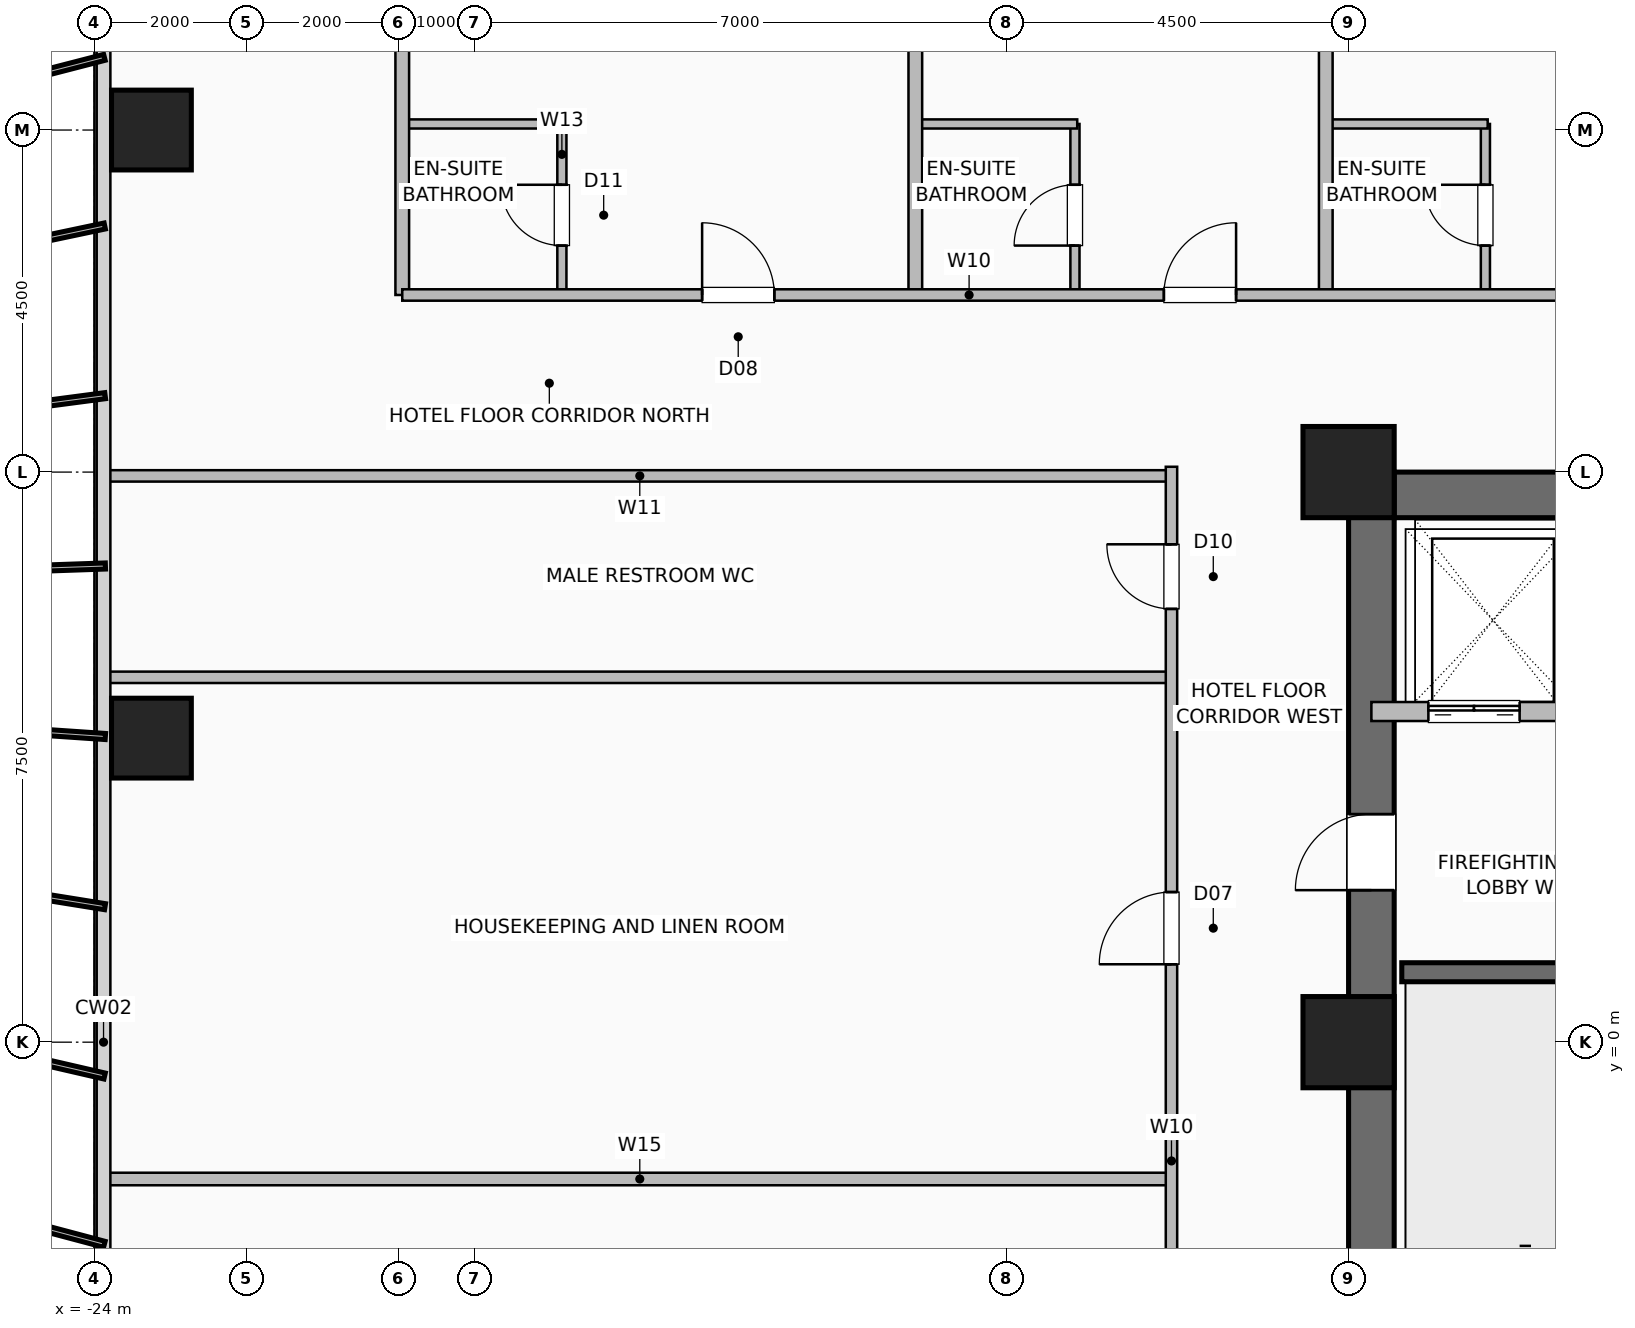
"""IFC4 building model, lengths in metres.
Left out: names, types, materials, properties, quantities, classifications, styles, units other than length and angle.
Written with IfcOpenShell. Run it as: python <this file> out.ifc"""

import sys

from ifc_helpers import new_model, si_unit, direction, frame, frame_2d, origin, origin_2d, place, context, subcontext, project, spatial, rectangle, hollow_rectangle, extrude, element, fill, save


model = new_model("IFC4")
c1 = context("Model", 3, precision=1e-05, world=origin(), true_north=direction((0.0, 1.0)))
c2 = subcontext(c1, "Body", "Model", "MODEL_VIEW")
j1 = project(units=[si_unit("LENGTHUNIT", "METRE"), si_unit("PLANEANGLEUNIT", "RADIAN")], contexts=[c1])
p1 = place(None, origin())
s1 = spatial("IfcSite", under=j1, at=p1, CompositionType="ELEMENT")
p2 = place(p1, origin())
s2 = spatial("IfcBuilding", under=s1, at=p2, CompositionType="ELEMENT")
p3 = place(p2, frame((0.0, 0.0, 69.0)))
s3 = spatial("IfcBuildingStorey", under=s2, at=p3, CompositionType="ELEMENT", Elevation=69.0)
for number, where, z_axis, x_axis in (
    (1, (-7.5, 7.5, 0.0), (0.0, 0.0, 1.0), (1.0, 0.0, 0.0)),
    (2, (-7.5, 0.0, 0.0), (0.0, 0.0, 1.0), (1.0, 0.0, 0.0)),
):
    element("IfcColumn", number, at=place(p3, frame(where, z_axis=z_axis, x_axis=x_axis)), inside=s3, PredefinedType="COLUMN", context=c2, shape_type="SweptSolid", body=[
        extrude(hollow_rectangle(XDim=1.2, YDim=1.2, WallThickness=0.055, at=origin_2d()), origin(), (0.0, 0.0, 1.0), 3.5),
    ])
for number, where, z_axis, x_axis in (
    (3, (-23.25, 4.0, 0.0), (0.0, 0.0, 1.0), (1.0, 0.0, 0.0)),
    (4, (-23.25, 12.0, 0.0), (0.0, 0.0, 1.0), (1.0, 0.0, 0.0)),
):
    element("IfcColumn", number, at=place(p3, frame(where, z_axis=z_axis, x_axis=x_axis)), inside=s3, PredefinedType="COLUMN", context=c2, shape_type="SweptSolid", body=[
        extrude(hollow_rectangle(XDim=1.05, YDim=1.05, WallThickness=0.05, at=origin_2d()), origin(), (0.0, 0.0, 1.0), 3.5),
    ])
p4 = place(p3, frame((-7.5, 7.2, 0.0), z_axis=(0.0, 0.0, 1.0), x_axis=(1.0, 0.0, 0.0)))
e5 = element("IfcWall", 5, at=p4, inside=s3, PredefinedType="SHEAR", context=c2, shape_type="SweptSolid", body=[
    extrude(rectangle(XDim=15.0, YDim=0.6, at=frame_2d((7.5, 0.0))), origin(), (0.0, 0.0, 1.0), 3.25),
])
p5 = place(p3, frame((-7.2, -7.5, 0.0), z_axis=(0.0, 0.0, 1.0), x_axis=(0.0, 1.0, 0.0)))
e6 = element("IfcWall", 6, at=p5, inside=s3, PredefinedType="SHEAR", context=c2, shape_type="SweptSolid", body=[
    extrude(rectangle(XDim=15.0, YDim=0.6, at=frame_2d((7.5, 0.0))), origin(), (0.0, 0.0, 1.0), 3.25),
])
p6 = place(p5, frame((9.5, 0.0, 0.0)))
e7 = element("IfcOpeningElement", 7, at=p6, cuts=e6, PredefinedType="OPENING", context=c2, shape_type="SweptSolid", body=[
    extrude(rectangle(XDim=1.0, YDim=2.08, at=frame_2d((0.5, 1.04))), frame((0.0, 0.31, 0.0), z_axis=(0.0, -1.0, 0.0), x_axis=(1.0, 0.0, 0.0)), (0.0, 0.0, 1.0), 0.62),
])
p7 = place(p3, frame((-6.8, 0.92, 0.0), z_axis=(0.0, 0.0, 1.0), x_axis=(1.0, 0.0, 0.0)))
e8 = element("IfcWall", 8, at=p7, inside=s3, PredefinedType="SHEAR", context=c2, shape_type="SweptSolid", body=[
    extrude(rectangle(XDim=3.33, YDim=0.25, at=frame_2d((1.665, 0.0))), origin(), (0.0, 0.0, 1.0), 3.25),
])
p8 = place(p3, frame((-7.2, 4.35, 0.0), z_axis=(0.0, 0.0, 1.0), x_axis=(1.0, 0.0, 0.0)))
e9 = element("IfcWall", 9, at=p8, inside=s3, PredefinedType="SHEAR", context=c2, shape_type="SweptSolid", body=[
    extrude(rectangle(XDim=2.7, YDim=0.25, at=frame_2d((1.35, 0.0))), origin(), (0.0, 0.0, 1.0), 3.25),
])
p9 = place(p8, frame((0.75, 0.0, 0.0)))
e10 = element("IfcOpeningElement", 10, at=p9, cuts=e9, PredefinedType="OPENING", context=c2, shape_type="SweptSolid", body=[
    extrude(rectangle(XDim=1.2, YDim=2.2, at=frame_2d((0.6, 1.1))), frame((0.0, 0.135, 0.0), z_axis=(0.0, -1.0, 0.0), x_axis=(1.0, 0.0, 0.0)), (0.0, 0.0, 1.0), 0.27),
])
p10 = place(p3, frame((-17.85, 9.83, 0.0), z_axis=(0.0, 0.0, 1.0), x_axis=(0.0, 1.0, 0.0)))
e11 = element("IfcWall", 11, at=p10, inside=s3, PredefinedType="PLUMBINGWALL", context=c2, shape_type="SweptSolid", body=[
    extrude(rectangle(XDim=2.25, YDim=0.12, at=frame_2d((1.125, 0.0))), origin(), (0.0, 0.0, 1.0), 3.25),
])
p11 = place(p10, frame((0.65, 0.0, 0.0)))
e12 = element("IfcOpeningElement", 12, at=p11, cuts=e11, PredefinedType="OPENING", context=c2, shape_type="SweptSolid", body=[
    extrude(rectangle(XDim=0.8, YDim=2.05, at=frame_2d((0.4, 1.025))), frame((0.0, 0.07, 0.0), z_axis=(0.0, -1.0, 0.0), x_axis=(1.0, 0.0, 0.0)), (0.0, 0.0, 1.0), 0.14),
])
p12 = place(p3, frame((-19.92, 12.08, 0.0), z_axis=(0.0, 0.0, 1.0), x_axis=(1.0, 0.0, 0.0)))
e13 = element("IfcWall", 13, at=p12, inside=s3, PredefinedType="PLUMBINGWALL", context=c2, shape_type="SweptSolid", body=[
    extrude(rectangle(XDim=2.1, YDim=0.12, at=frame_2d((1.05, 0.0))), origin(), (0.0, 0.0, 1.0), 3.25),
])
p13 = place(p3, frame((-11.1, 9.83, 0.0), z_axis=(0.0, 0.0, 1.0), x_axis=(0.0, 1.0, 0.0)))
e14 = element("IfcWall", 14, at=p13, inside=s3, PredefinedType="PLUMBINGWALL", context=c2, shape_type="SweptSolid", body=[
    extrude(rectangle(XDim=2.25, YDim=0.12, at=frame_2d((1.125, 0.0))), origin(), (0.0, 0.0, 1.0), 3.25),
])
p14 = place(p13, frame((0.65, 0.0, 0.0)))
e15 = element("IfcOpeningElement", 15, at=p14, cuts=e14, PredefinedType="OPENING", context=c2, shape_type="SweptSolid", body=[
    extrude(rectangle(XDim=0.8, YDim=2.05, at=frame_2d((0.4, 1.025))), frame((0.0, 0.07, 0.0), z_axis=(0.0, -1.0, 0.0), x_axis=(1.0, 0.0, 0.0)), (0.0, 0.0, 1.0), 0.14),
])
p15 = place(p3, frame((-13.17, 12.08, 0.0), z_axis=(0.0, 0.0, 1.0), x_axis=(1.0, 0.0, 0.0)))
e16 = element("IfcWall", 16, at=p15, inside=s3, PredefinedType="PLUMBINGWALL", context=c2, shape_type="SweptSolid", body=[
    extrude(rectangle(XDim=2.1, YDim=0.12, at=frame_2d((1.05, 0.0))), origin(), (0.0, 0.0, 1.0), 3.25),
])
p16 = place(p3, frame((-5.7, 9.83, 0.0), z_axis=(0.0, 0.0, 1.0), x_axis=(0.0, 1.0, 0.0)))
e17 = element("IfcWall", 17, at=p16, inside=s3, PredefinedType="PLUMBINGWALL", context=c2, shape_type="SweptSolid", body=[
    extrude(rectangle(XDim=2.25, YDim=0.12, at=frame_2d((1.125, 0.0))), origin(), (0.0, 0.0, 1.0), 3.25),
])
p17 = place(p16, frame((0.65, 0.0, 0.0)))
e18 = element("IfcOpeningElement", 18, at=p17, cuts=e17, PredefinedType="OPENING", context=c2, shape_type="SweptSolid", body=[
    extrude(rectangle(XDim=0.8, YDim=2.05, at=frame_2d((0.4, 1.025))), frame((0.0, 0.07, 0.0), z_axis=(0.0, -1.0, 0.0), x_axis=(1.0, 0.0, 0.0)), (0.0, 0.0, 1.0), 0.14),
])
p18 = place(p3, frame((-7.77, 12.08, 0.0), z_axis=(0.0, 0.0, 1.0), x_axis=(1.0, 0.0, 0.0)))
e19 = element("IfcWall", 19, at=p18, inside=s3, PredefinedType="PLUMBINGWALL", context=c2, shape_type="SweptSolid", body=[
    extrude(rectangle(XDim=2.1, YDim=0.12, at=frame_2d((1.05, 0.0))), origin(), (0.0, 0.0, 1.0), 3.25),
])
for number, where, z_axis, x_axis in (
    (20, (-19.95, 9.83, 0.0), (0.0, 0.0, 1.0), (0.0, 1.0, 0.0)),
    (21, (-13.2, 9.83, 0.0), (0.0, 0.0, 1.0), (0.0, 1.0, 0.0)),
    (22, (-7.8, 9.83, 0.0), (0.0, 0.0, 1.0), (0.0, 1.0, 0.0)),
):
    element("IfcWall", number, at=place(p3, frame(where, z_axis=z_axis, x_axis=x_axis)), inside=s3, PredefinedType="PARTITIONING", context=c2, shape_type="SweptSolid", body=[
        extrude(rectangle(XDim=13.99, YDim=0.18, at=frame_2d((6.995, 0.0))), origin(), (0.0, 0.0, 1.0), 3.25),
    ])
p19 = place(p3, frame((-19.95, 9.83, 0.0), z_axis=(0.0, 0.0, 1.0), x_axis=(1.0, 0.0, 0.0)))
e23 = element("IfcWall", 23, at=p19, inside=s3, PredefinedType="PARTITIONING", context=c2, shape_type="SweptSolid", body=[
    extrude(rectangle(XDim=39.9, YDim=0.15, at=frame_2d((19.95, 0.0))), origin(), (0.0, 0.0, 1.0), 3.25),
])
p20 = place(p19, frame((3.945, 0.0, 0.0)))
e24 = element("IfcOpeningElement", 24, at=p20, cuts=e23, PredefinedType="OPENING", context=c2, shape_type="SweptSolid", body=[
    extrude(rectangle(XDim=0.95, YDim=2.08, at=frame_2d((0.475, 1.04))), frame((0.0, 0.085, 0.0), z_axis=(0.0, -1.0, 0.0), x_axis=(1.0, 0.0, 0.0)), (0.0, 0.0, 1.0), 0.17),
])
p21 = place(p19, frame((10.02, 0.0, 0.0)))
e25 = element("IfcOpeningElement", 25, at=p21, cuts=e23, PredefinedType="OPENING", context=c2, shape_type="SweptSolid", body=[
    extrude(rectangle(XDim=0.95, YDim=2.08, at=frame_2d((0.475, 1.04))), frame((0.0, 0.085, 0.0), z_axis=(0.0, -1.0, 0.0), x_axis=(1.0, 0.0, 0.0)), (0.0, 0.0, 1.0), 0.17),
])
p22 = place(p19, frame((15.42, 0.0, 0.0)))
e26 = element("IfcOpeningElement", 26, at=p22, cuts=e23, PredefinedType="OPENING", context=c2, shape_type="SweptSolid", body=[
    extrude(rectangle(XDim=0.95, YDim=2.08, at=frame_2d((0.475, 1.04))), frame((0.0, 0.085, 0.0), z_axis=(0.0, -1.0, 0.0), x_axis=(1.0, 0.0, 0.0)), (0.0, 0.0, 1.0), 0.17),
])
p23 = place(p19, frame((20.702, 0.0, 0.0)))
e27 = element("IfcOpeningElement", 27, at=p23, cuts=e23, PredefinedType="OPENING", context=c2, shape_type="SweptSolid", body=[
    extrude(rectangle(XDim=0.95, YDim=2.08, at=frame_2d((0.475, 1.04))), frame((0.0, 0.085, 0.0), z_axis=(0.0, -1.0, 0.0), x_axis=(1.0, 0.0, 0.0)), (0.0, 0.0, 1.0), 0.17),
])
p24 = place(p19, frame((26.02, 0.0, 0.0)))
e28 = element("IfcOpeningElement", 28, at=p24, cuts=e23, PredefinedType="OPENING", context=c2, shape_type="SweptSolid", body=[
    extrude(rectangle(XDim=0.95, YDim=2.08, at=frame_2d((0.475, 1.04))), frame((0.0, 0.085, 0.0), z_axis=(0.0, -1.0, 0.0), x_axis=(1.0, 0.0, 0.0)), (0.0, 0.0, 1.0), 0.17),
])
p25 = place(p19, frame((31.37, 0.0, 0.0)))
e29 = element("IfcOpeningElement", 29, at=p25, cuts=e23, PredefinedType="OPENING", context=c2, shape_type="SweptSolid", body=[
    extrude(rectangle(XDim=0.95, YDim=2.08, at=frame_2d((0.475, 1.04))), frame((0.0, 0.085, 0.0), z_axis=(0.0, -1.0, 0.0), x_axis=(1.0, 0.0, 0.0)), (0.0, 0.0, 1.0), 0.17),
])
p26 = place(p19, frame((37.245, 0.0, 0.0)))
e30 = element("IfcOpeningElement", 30, at=p26, cuts=e23, PredefinedType="OPENING", context=c2, shape_type="SweptSolid", body=[
    extrude(rectangle(XDim=0.95, YDim=2.08, at=frame_2d((0.475, 1.04))), frame((0.0, 0.085, 0.0), z_axis=(0.0, -1.0, 0.0), x_axis=(1.0, 0.0, 0.0)), (0.0, 0.0, 1.0), 0.17),
])
p27 = place(p3, frame((-23.82, -1.8, 0.0), z_axis=(0.0, 0.0, 1.0), x_axis=(1.0, 0.0, 0.0)))
e31 = element("IfcWall", 31, at=p27, inside=s3, PredefinedType="PLUMBINGWALL", context=c2, shape_type="SweptSolid", body=[
    extrude(rectangle(XDim=13.99, YDim=0.165, at=frame_2d((6.995, 0.0))), origin(), (0.0, 0.0, 1.0), 3.25),
])
p28 = place(p3, frame((-23.82, 4.8, 0.0), z_axis=(0.0, 0.0, 1.0), x_axis=(1.0, 0.0, 0.0)))
e32 = element("IfcWall", 32, at=p28, inside=s3, PredefinedType="PARTITIONING", context=c2, shape_type="SweptSolid", body=[
    extrude(rectangle(XDim=13.99, YDim=0.15, at=frame_2d((6.995, 0.0))), origin(), (0.0, 0.0, 1.0), 2.818),
])
p29 = place(p3, frame((-23.82, 7.45, 0.0), z_axis=(0.0, 0.0, 1.0), x_axis=(1.0, 0.0, 0.0)))
e33 = element("IfcWall", 33, at=p29, inside=s3, PredefinedType="PARTITIONING", context=c2, shape_type="SweptSolid", body=[
    extrude(rectangle(XDim=13.99, YDim=0.15, at=frame_2d((6.995, 0.0))), origin(), (0.0, 0.0, 1.0), 3.25),
])
p30 = place(p3, frame((-9.83, -7.57, 0.0), z_axis=(0.0, 0.0, 1.0), x_axis=(0.0, 1.0, 0.0)))
e34 = element("IfcWall", 34, at=p30, inside=s3, PredefinedType="PARTITIONING", context=c2, shape_type="SweptSolid", body=[
    extrude(rectangle(XDim=15.14, YDim=0.15, at=frame_2d((7.57, 0.0))), origin(), (0.0, 0.0, 1.0), 3.25),
])
p31 = place(p30, frame((2.47, 0.0, 0.0)))
e35 = element("IfcOpeningElement", 35, at=p31, cuts=e34, PredefinedType="OPENING", context=c2, shape_type="SweptSolid", body=[
    extrude(rectangle(XDim=0.95, YDim=2.06, at=frame_2d((0.475, 1.03))), frame((0.0, 0.085, 0.0), z_axis=(0.0, -1.0, 0.0), x_axis=(1.0, 0.0, 0.0)), (0.0, 0.0, 1.0), 0.17),
])
p32 = place(p30, frame((8.595, 0.0, 0.0)))
e36 = element("IfcOpeningElement", 36, at=p32, cuts=e34, PredefinedType="OPENING", context=c2, shape_type="SweptSolid", body=[
    extrude(rectangle(XDim=0.95, YDim=2.06, at=frame_2d((0.475, 1.03))), frame((0.0, 0.085, 0.0), z_axis=(0.0, -1.0, 0.0), x_axis=(1.0, 0.0, 0.0)), (0.0, 0.0, 1.0), 0.17),
])
p33 = place(p30, frame((13.27, 0.0, 0.0)))
e37 = element("IfcOpeningElement", 37, at=p33, cuts=e34, PredefinedType="OPENING", context=c2, shape_type="SweptSolid", body=[
    extrude(rectangle(XDim=0.85, YDim=2.05, at=frame_2d((0.425, 1.025))), frame((0.0, 0.085, 0.0), z_axis=(0.0, -1.0, 0.0), x_axis=(1.0, 0.0, 0.0)), (0.0, 0.0, 1.0), 0.17),
])
p34 = place(p6, origin())
e38 = element("IfcDoor", 38, at=p34, inside=s3, OperationType="SINGLE_SWING_LEFT", PredefinedType="DOOR", context=c2, shape_type="SweptSolid", body=[
    extrude(rectangle(XDim=1.0, YDim=2.08, at=frame_2d((0.5, 1.04))), frame((0.0, 0.025, 0.0), z_axis=(0.0, -1.0, 0.0), x_axis=(1.0, 0.0, 0.0)), (0.0, 0.0, 1.0), 0.05),
])
fill(e7, e38)
p35 = place(p9, origin())
e39 = element("IfcDoor", 39, at=p35, inside=s3, OperationType="DOUBLE_DOOR_SLIDING", PredefinedType="DOOR", context=c2, shape_type="SweptSolid", body=[
    extrude(rectangle(XDim=1.2, YDim=2.2, at=frame_2d((0.6, 1.1))), frame((0.0, 0.025, 0.0), z_axis=(0.0, -1.0, 0.0), x_axis=(1.0, 0.0, 0.0)), (0.0, 0.0, 1.0), 0.05),
])
fill(e10, e39)
p36 = place(p11, origin())
e40 = element("IfcDoor", 40, at=p36, inside=s3, OperationType="SINGLE_SWING_RIGHT", PredefinedType="DOOR", context=c2, shape_type="SweptSolid", body=[
    extrude(rectangle(XDim=0.8, YDim=2.05, at=frame_2d((0.4, 1.025))), frame((0.0, 0.025, 0.0), z_axis=(0.0, -1.0, 0.0), x_axis=(1.0, 0.0, 0.0)), (0.0, 0.0, 1.0), 0.05),
])
fill(e12, e40)
p37 = place(p14, origin())
e41 = element("IfcDoor", 41, at=p37, inside=s3, OperationType="SINGLE_SWING_LEFT", PredefinedType="DOOR", context=c2, shape_type="SweptSolid", body=[
    extrude(rectangle(XDim=0.8, YDim=2.05, at=frame_2d((0.4, 1.025))), frame((0.0, 0.025, 0.0), z_axis=(0.0, -1.0, 0.0), x_axis=(1.0, 0.0, 0.0)), (0.0, 0.0, 1.0), 0.05),
])
fill(e15, e41)
p38 = place(p17, origin())
e42 = element("IfcDoor", 42, at=p38, inside=s3, OperationType="SINGLE_SWING_RIGHT", PredefinedType="DOOR", context=c2, shape_type="SweptSolid", body=[
    extrude(rectangle(XDim=0.8, YDim=2.05, at=frame_2d((0.4, 1.025))), frame((0.0, 0.025, 0.0), z_axis=(0.0, -1.0, 0.0), x_axis=(1.0, 0.0, 0.0)), (0.0, 0.0, 1.0), 0.05),
])
fill(e18, e42)
p39 = place(p20, origin())
e43 = element("IfcDoor", 43, at=p39, inside=s3, OperationType="SINGLE_SWING_LEFT", PredefinedType="DOOR", context=c2, shape_type="SweptSolid", body=[
    extrude(rectangle(XDim=0.95, YDim=2.08, at=frame_2d((0.475, 1.04))), frame((0.0, 0.025, 0.0), z_axis=(0.0, -1.0, 0.0), x_axis=(1.0, 0.0, 0.0)), (0.0, 0.0, 1.0), 0.05),
])
fill(e24, e43)
p40 = place(p21, origin())
e44 = element("IfcDoor", 44, at=p40, inside=s3, OperationType="SINGLE_SWING_RIGHT", PredefinedType="DOOR", context=c2, shape_type="SweptSolid", body=[
    extrude(rectangle(XDim=0.95, YDim=2.08, at=frame_2d((0.475, 1.04))), frame((0.0, 0.025, 0.0), z_axis=(0.0, -1.0, 0.0), x_axis=(1.0, 0.0, 0.0)), (0.0, 0.0, 1.0), 0.05),
])
fill(e25, e44)
p41 = place(p32, origin())
e45 = element("IfcDoor", 45, at=p41, inside=s3, OperationType="SINGLE_SWING_LEFT", PredefinedType="DOOR", context=c2, shape_type="SweptSolid", body=[
    extrude(rectangle(XDim=0.95, YDim=2.06, at=frame_2d((0.475, 1.03))), frame((0.0, 0.025, 0.0), z_axis=(0.0, -1.0, 0.0), x_axis=(1.0, 0.0, 0.0)), (0.0, 0.0, 1.0), 0.05),
])
fill(e36, e45)
p42 = place(p33, origin())
e46 = element("IfcDoor", 46, at=p42, inside=s3, OperationType="SINGLE_SWING_RIGHT", PredefinedType="DOOR", context=c2, shape_type="SweptSolid", body=[
    extrude(rectangle(XDim=0.85, YDim=2.05, at=frame_2d((0.425, 1.025))), frame((0.0, 0.025, 0.0), z_axis=(0.0, -1.0, 0.0), x_axis=(1.0, 0.0, 0.0)), (0.0, 0.0, 1.0), 0.05),
])
fill(e37, e46)
save(model, sys.argv[1])
